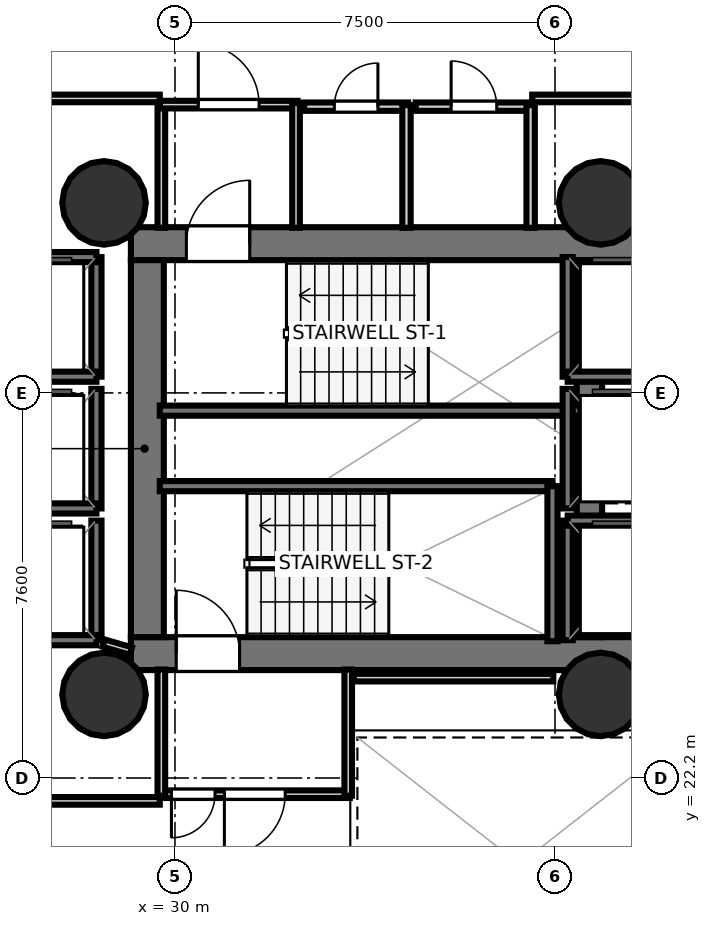
"""IFC4 building model, lengths in metres.
Left out: names, types, materials, properties, quantities, classifications, styles, units other than length and angle.
Written with IfcOpenShell. Run it as: python <this file> out.ifc"""

import sys

from ifc_helpers import new_model, si_unit, direction, frame, frame_2d, origin, origin_2d, place, context, subcontext, project, spatial, rectangle, hollow_circle, extrude, element, fill, save


model = new_model("IFC4")
c1 = context("Model", 3, precision=1e-05, world=origin(), true_north=direction((0.0, 1.0)))
c2 = subcontext(c1, "Body", "Model", "MODEL_VIEW")
j1 = project(units=[si_unit("LENGTHUNIT", "METRE"), si_unit("PLANEANGLEUNIT", "RADIAN")], contexts=[c1])
p1 = place(None, origin())
s1 = spatial("IfcSite", under=j1, at=p1, CompositionType="ELEMENT")
p2 = place(p1, origin())
s2 = spatial("IfcBuilding", under=s1, at=p2, CompositionType="ELEMENT")
p3 = place(p2, frame((0.0, 0.0, 56.2)))
s3 = spatial("IfcBuildingStorey", under=s2, at=p3, CompositionType="ELEMENT", Elevation=56.2)
p4 = place(p3, frame((29.13, 32.745, 0.0), z_axis=(0.0, 0.0, 1.0), x_axis=(1.0, 0.0, 0.0)))
e1 = element("IfcWall", 1, at=p4, inside=s3, PredefinedType="SHEAR", context=c2, shape_type="SweptSolid", body=[
    extrude(rectangle(XDim=10.72, YDim=0.65, at=frame_2d((5.36, 0.0))), origin(), (0.0, 0.0, 1.0), 3.52),
])
p5 = place(p4, frame((1.095, 0.0, 0.0)))
e2 = element("IfcOpeningElement", 2, at=p5, cuts=e1, PredefinedType="OPENING", context=c2, shape_type="SweptSolid", body=[
    extrude(rectangle(XDim=1.25, YDim=2.15, at=frame_2d((0.625, 1.075))), frame((0.0, 0.335, 0.0), z_axis=(0.0, -1.0, 0.0), x_axis=(1.0, 0.0, 0.0)), (0.0, 0.0, 1.0), 0.67),
])
p6 = place(p3, frame((29.13, 24.655, 0.0), z_axis=(0.0, 0.0, 1.0), x_axis=(1.0, 0.0, 0.0)))
e3 = element("IfcWall", 3, at=p6, inside=s3, PredefinedType="SHEAR", context=c2, shape_type="SweptSolid", body=[
    extrude(rectangle(XDim=10.72, YDim=0.65, at=frame_2d((5.36, 0.0))), origin(), (0.0, 0.0, 1.0), 3.52),
])
p7 = place(p6, frame((0.895, 0.0, 0.0)))
e4 = element("IfcOpeningElement", 4, at=p7, cuts=e3, PredefinedType="OPENING", context=c2, shape_type="SweptSolid", body=[
    extrude(rectangle(XDim=1.25, YDim=2.15, at=frame_2d((0.625, 1.075))), frame((0.0, 0.335, 0.0), z_axis=(0.0, -1.0, 0.0), x_axis=(1.0, 0.0, 0.0)), (0.0, 0.0, 1.0), 0.67),
])
p8 = place(p3, frame((29.455, 24.98, 0.0), z_axis=(0.0, 0.0, 1.0), x_axis=(0.0, 1.0, 0.0)))
e5 = element("IfcWall", 5, at=p8, inside=s3, PredefinedType="SHEAR", context=c2, shape_type="SweptSolid", body=[
    extrude(rectangle(XDim=7.44, YDim=0.65, at=frame_2d((3.72, 0.0))), origin(), (0.0, 0.0, 1.0), 3.52),
])
p9 = place(p3, frame((38.18, 24.98, 0.0), z_axis=(0.0, 0.0, 1.0), x_axis=(0.0, 1.0, 0.0)))
e6 = element("IfcWall", 6, at=p9, inside=s3, PredefinedType="SHEAR", context=c2, shape_type="SweptSolid", body=[
    extrude(rectangle(XDim=7.44, YDim=0.5, at=frame_2d((3.72, 0.0))), origin(), (0.0, 0.0, 1.0), 3.52),
])
for number, where, z_axis, x_axis in (
    (7, (28.6, 33.55, 0.0), (0.0, 0.0, 1.0), (1.0, 0.0, 0.0)),
    (8, (28.6, 23.85, 0.0), (0.0, 0.0, 1.0), (1.0, 0.0, 0.0)),
    (9, (38.4, 33.55, 0.0), (0.0, 0.0, 1.0), (1.0, 0.0, 0.0)),
    (10, (38.4, 23.85, 0.0), (0.0, 0.0, 1.0), (1.0, 0.0, 0.0)),
):
    element("IfcColumn", number, at=place(p3, frame(where, z_axis=z_axis, x_axis=x_axis)), inside=s3, PredefinedType="COLUMN", context=c2, shape_type="SweptSolid", body=[
        extrude(hollow_circle(Radius=0.825, WallThickness=0.04, at=origin_2d()), origin(), (0.0, 0.0, 1.0), 3.7),
    ])
p10 = place(p3, frame((29.7, 29.45, 0.0), z_axis=(0.0, 0.0, 1.0), x_axis=(1.0, 0.0, 0.0)))
e11 = element("IfcWall", 11, at=p10, inside=s3, PredefinedType="SOLIDWALL", context=c2, shape_type="SweptSolid", body=[
    extrude(rectangle(XDim=8.3, YDim=0.2, at=frame_2d((4.15, 0.0))), origin(), (0.0, 0.0, 1.0), 3.52),
])
p11 = place(p3, frame((29.7, 27.96, 0.0), z_axis=(0.0, 0.0, 1.0), x_axis=(1.0, 0.0, 0.0)))
e12 = element("IfcWall", 12, at=p11, inside=s3, PredefinedType="SOLIDWALL", context=c2, shape_type="SweptSolid", body=[
    extrude(rectangle(XDim=7.75, YDim=0.2, at=frame_2d((3.875, 0.0))), origin(), (0.0, 0.0, 1.0), 3.52),
])
p12 = place(p3, frame((37.45, 24.9, 0.0), z_axis=(0.0, 0.0, 1.0), x_axis=(0.0, 1.0, 0.0)))
e13 = element("IfcWall", 13, at=p12, inside=s3, PredefinedType="SOLIDWALL", context=c2, shape_type="SweptSolid", body=[
    extrude(rectangle(XDim=3.06, YDim=0.2, at=frame_2d((1.53, 0.0))), origin(), (0.0, 0.0, 1.0), 3.52),
])
p13 = place(p3, frame((37.75, 30.12, 0.0), z_axis=(0.0, 0.0, 1.0), x_axis=(0.0, 1.0, 0.0)))
e14 = element("IfcWall", 14, at=p13, inside=s3, PredefinedType="SOLIDWALL", context=c2, shape_type="SweptSolid", body=[
    extrude(rectangle(XDim=2.36, YDim=0.2, at=frame_2d((1.18, 0.0))), origin(), (0.0, 0.0, 1.0), 3.52),
])
p14 = place(p3, frame((37.75, 30.12, 0.0), z_axis=(0.0, 0.0, 1.0), x_axis=(1.0, 0.0, 0.0)))
e15 = element("IfcWall", 15, at=p14, inside=s3, PredefinedType="SOLIDWALL", context=c2, shape_type="SweptSolid", body=[
    extrude(rectangle(XDim=2.1, YDim=0.2, at=frame_2d((1.05, 0.0))), origin(), (0.0, 0.0, 1.0), 3.52),
])
p15 = place(p3, frame((37.75, 24.92, 0.0), z_axis=(0.0, 0.0, 1.0), x_axis=(0.0, 1.0, 0.0)))
e16 = element("IfcWall", 16, at=p15, inside=s3, PredefinedType="SOLIDWALL", context=c2, shape_type="SweptSolid", body=[
    extrude(rectangle(XDim=2.36, YDim=0.2, at=frame_2d((1.18, 0.0))), origin(), (0.0, 0.0, 1.0), 3.52),
])
p16 = place(p3, frame((37.75, 27.28, 0.0), z_axis=(0.0, 0.0, 1.0), x_axis=(1.0, 0.0, 0.0)))
e17 = element("IfcWall", 17, at=p16, inside=s3, PredefinedType="SOLIDWALL", context=c2, shape_type="SweptSolid", body=[
    extrude(rectangle(XDim=2.1, YDim=0.2, at=frame_2d((1.05, 0.0))), origin(), (0.0, 0.0, 1.0), 3.52),
])
p17 = place(p3, frame((28.45, 30.12, 0.0), z_axis=(0.0, 0.0, 1.0), x_axis=(0.0, 1.0, 0.0)))
e18 = element("IfcWall", 18, at=p17, inside=s3, PredefinedType="SOLIDWALL", context=c2, shape_type="SweptSolid", body=[
    extrude(rectangle(XDim=2.36, YDim=0.2, at=frame_2d((1.18, 0.0))), origin(), (0.0, 0.0, 1.0), 3.52),
])
for number, where, z_axis, x_axis in (
    (19, (26.35, 32.48, 0.0), (0.0, 0.0, 1.0), (1.0, 0.0, 0.0)),
    (20, (26.35, 30.12, 0.0), (0.0, 0.0, 1.0), (1.0, 0.0, 0.0)),
):
    element("IfcWall", number, at=place(p3, frame(where, z_axis=z_axis, x_axis=x_axis)), inside=s3, PredefinedType="SOLIDWALL", context=c2, shape_type="SweptSolid", body=[
        extrude(rectangle(XDim=2.1, YDim=0.2, at=frame_2d((1.05, 0.0))), origin(), (0.0, 0.0, 1.0), 3.52),
    ])
p18 = place(p3, frame((28.45, 27.52, 0.0), z_axis=(0.0, 0.0, 1.0), x_axis=(0.0, 1.0, 0.0)))
e21 = element("IfcWall", 21, at=p18, inside=s3, PredefinedType="SOLIDWALL", context=c2, shape_type="SweptSolid", body=[
    extrude(rectangle(XDim=2.36, YDim=0.2, at=frame_2d((1.18, 0.0))), origin(), (0.0, 0.0, 1.0), 3.52),
])
p19 = place(p3, frame((26.35, 27.52, 0.0), z_axis=(0.0, 0.0, 1.0), x_axis=(1.0, 0.0, 0.0)))
e22 = element("IfcWall", 22, at=p19, inside=s3, PredefinedType="SOLIDWALL", context=c2, shape_type="SweptSolid", body=[
    extrude(rectangle(XDim=2.1, YDim=0.2, at=frame_2d((1.05, 0.0))), origin(), (0.0, 0.0, 1.0), 3.52),
])
p20 = place(p3, frame((28.45, 24.92, 0.0), z_axis=(0.0, 0.0, 1.0), x_axis=(0.0, 1.0, 0.0)))
e23 = element("IfcWall", 23, at=p20, inside=s3, PredefinedType="SOLIDWALL", context=c2, shape_type="SweptSolid", body=[
    extrude(rectangle(XDim=2.36, YDim=0.2, at=frame_2d((1.18, 0.0))), origin(), (0.0, 0.0, 1.0), 3.52),
])
p21 = place(p3, frame((26.35, 24.92, 0.0), z_axis=(0.0, 0.0, 1.0), x_axis=(1.0, 0.0, 0.0)))
e24 = element("IfcWall", 24, at=p21, inside=s3, PredefinedType="SOLIDWALL", context=c2, shape_type="SweptSolid", body=[
    extrude(rectangle(XDim=2.1, YDim=0.2, at=frame_2d((1.05, 0.0))), origin(), (0.0, 0.0, 1.0), 3.52),
])
p22 = place(p3, frame((37.75, 27.52, 0.0), z_axis=(0.0, 0.0, 1.0), x_axis=(0.0, 1.0, 0.0)))
e25 = element("IfcWall", 25, at=p22, inside=s3, PredefinedType="SOLIDWALL", context=c2, shape_type="SweptSolid", body=[
    extrude(rectangle(XDim=2.36, YDim=0.2, at=frame_2d((1.18, 0.0))), origin(), (0.0, 0.0, 1.0), 3.52),
])
p23 = place(p3, frame((29.731, 33.058, 0.0), z_axis=(0.0, 0.0, 1.0), x_axis=(0.0, 1.0, 0.0)))
e26 = element("IfcWall", 26, at=p23, inside=s3, PredefinedType="PARTITIONING", context=c2, shape_type="SweptSolid", body=[
    extrude(rectangle(XDim=2.462, YDim=0.15, at=frame_2d((1.231, 0.0))), origin(), (0.0, 0.0, 1.0), 2.84),
])
p24 = place(p3, frame((29.7, 35.489, 0.0), z_axis=(0.0, 0.0, 1.0), x_axis=(1.0, 0.0, 0.0)))
e27 = element("IfcWall", 27, at=p24, inside=s3, PredefinedType="PARTITIONING", context=c2, shape_type="SweptSolid", body=[
    extrude(rectangle(XDim=2.72, YDim=0.15, at=frame_2d((1.36, 0.0))), origin(), (0.0, 0.0, 1.0), 2.84),
])
p25 = place(p24, frame((0.76, 0.0, 0.0)))
e28 = element("IfcOpeningElement", 28, at=p25, cuts=e27, PredefinedType="OPENING", context=c2, shape_type="SweptSolid", body=[
    extrude(rectangle(XDim=1.2, YDim=2.15, at=frame_2d((0.6, 1.075))), frame((0.0, 0.085, 0.0), z_axis=(0.0, -1.0, 0.0), x_axis=(1.0, 0.0, 0.0)), (0.0, 0.0, 1.0), 0.17),
])
p26 = place(p3, frame((32.389, 35.52, 0.0), z_axis=(0.0, 0.0, 1.0), x_axis=(0.0, -1.0, 0.0)))
e29 = element("IfcWall", 29, at=p26, inside=s3, PredefinedType="PARTITIONING", context=c2, shape_type="SweptSolid", body=[
    extrude(rectangle(XDim=2.462, YDim=0.15, at=frame_2d((1.231, 0.0))), origin(), (0.0, 0.0, 1.0), 2.84),
])
p27 = place(p3, frame((33.45, 21.881, 0.0), z_axis=(0.0, 0.0, 1.0), x_axis=(-1.0, 0.0, 0.0)))
e30 = element("IfcWall", 30, at=p27, inside=s3, PredefinedType="PARTITIONING", context=c2, shape_type="SweptSolid", body=[
    extrude(rectangle(XDim=3.75, YDim=0.15, at=frame_2d((1.875, 0.0))), origin(), (0.0, 0.0, 1.0), 2.84),
])
p28 = place(p27, frame((1.275, 0.0, 0.0)))
e31 = element("IfcOpeningElement", 31, at=p28, cuts=e30, PredefinedType="OPENING", context=c2, shape_type="SweptSolid", body=[
    extrude(rectangle(XDim=1.2, YDim=2.15, at=frame_2d((0.6, 1.075))), frame((0.0, 0.085, 0.0), z_axis=(0.0, -1.0, 0.0), x_axis=(1.0, 0.0, 0.0)), (0.0, 0.0, 1.0), 0.17),
])
p29 = place(p27, frame((2.66, 0.0, 0.0)))
e32 = element("IfcOpeningElement", 32, at=p29, cuts=e30, PredefinedType="OPENING", context=c2, shape_type="SweptSolid", body=[
    extrude(rectangle(XDim=0.86, YDim=2.05, at=frame_2d((0.43, 1.025))), frame((0.0, 0.085, 0.0), z_axis=(0.0, -1.0, 0.0), x_axis=(1.0, 0.0, 0.0)), (0.0, 0.0, 1.0), 0.17),
])
for number, where, z_axis, x_axis in (
    (33, (29.731, 21.85, 0.0), (0.0, 0.0, 1.0), (0.0, 1.0, 0.0)),
    (34, (33.419, 24.342, 0.0), (0.0, 0.0, 1.0), (0.0, -1.0, 0.0)),
):
    element("IfcWall", number, at=place(p3, frame(where, z_axis=z_axis, x_axis=x_axis)), inside=s3, PredefinedType="PARTITIONING", context=c2, shape_type="SweptSolid", body=[
        extrude(rectangle(XDim=2.492, YDim=0.15, at=frame_2d((1.246, 0.0))), origin(), (0.0, 0.0, 1.0), 2.84),
    ])
p30 = place(p3, frame((32.55, 35.449, 0.0), z_axis=(0.0, 0.0, 1.0), x_axis=(1.0, 0.0, 0.0)))
e35 = element("IfcWall", 35, at=p30, inside=s3, PredefinedType="PLUMBINGWALL", context=c2, shape_type="SweptSolid", body=[
    extrude(rectangle(XDim=2.05, YDim=0.165, at=frame_2d((1.025, 0.0))), origin(), (0.0, 0.0, 1.0), 2.84),
])
p31 = place(p30, frame((0.595, 0.0, 0.0)))
e36 = element("IfcOpeningElement", 36, at=p31, cuts=e35, PredefinedType="OPENING", context=c2, shape_type="SweptSolid", body=[
    extrude(rectangle(XDim=0.86, YDim=2.05, at=frame_2d((0.43, 1.025))), frame((0.0, 0.093, 0.0), z_axis=(0.0, -1.0, 0.0), x_axis=(1.0, 0.0, 0.0)), (0.0, 0.0, 1.0), 0.185),
])
p32 = place(p3, frame((34.569, 35.48, 0.0), z_axis=(0.0, 0.0, 1.0), x_axis=(0.0, -1.0, 0.0)))
e37 = element("IfcWall", 37, at=p32, inside=s3, PredefinedType="PLUMBINGWALL", context=c2, shape_type="SweptSolid", body=[
    extrude(rectangle(XDim=2.422, YDim=0.165, at=frame_2d((1.211, 0.0))), origin(), (0.0, 0.0, 1.0), 2.84),
])
p33 = place(p3, frame((34.75, 35.449, 0.0), z_axis=(0.0, 0.0, 1.0), x_axis=(1.0, 0.0, 0.0)))
e38 = element("IfcWall", 38, at=p33, inside=s3, PredefinedType="PLUMBINGWALL", context=c2, shape_type="SweptSolid", body=[
    extrude(rectangle(XDim=2.3, YDim=0.165, at=frame_2d((1.15, 0.0))), origin(), (0.0, 0.0, 1.0), 2.84),
])
p34 = place(p33, frame((0.7, 0.0, 0.0)))
e39 = element("IfcOpeningElement", 39, at=p34, cuts=e38, PredefinedType="OPENING", context=c2, shape_type="SweptSolid", body=[
    extrude(rectangle(XDim=0.9, YDim=2.1, at=frame_2d((0.45, 1.05))), frame((0.0, 0.093, 0.0), z_axis=(0.0, -1.0, 0.0), x_axis=(1.0, 0.0, 0.0)), (0.0, 0.0, 1.0), 0.185),
])
p35 = place(p3, frame((37.019, 35.48, 0.0), z_axis=(0.0, 0.0, 1.0), x_axis=(0.0, -1.0, 0.0)))
e40 = element("IfcWall", 40, at=p35, inside=s3, PredefinedType="PLUMBINGWALL", context=c2, shape_type="SweptSolid", body=[
    extrude(rectangle(XDim=2.422, YDim=0.165, at=frame_2d((1.211, 0.0))), origin(), (0.0, 0.0, 1.0), 2.84),
])
p36 = place(p3, frame((29.13, 24.706, 0.0), z_axis=(0.0, 0.0, 1.0), x_axis=(-0.960451214223, 0.278448316742, 0.0)))
e41 = element("IfcWall", 41, at=p36, inside=s3, PredefinedType="PARTITIONING", context=c2, shape_type="SweptSolid", body=[
    extrude(rectangle(XDim=0.562, YDim=0.15, at=frame_2d((0.281, 0.0))), origin(), (0.0, 0.0, 1.0), 2.84),
])
p37 = place(p3, frame((37.467, 24.181, 0.0), z_axis=(0.0, 0.0, 1.0), x_axis=(-1.0, 0.0, 0.0)))
e42 = element("IfcWall", 42, at=p37, inside=s3, PredefinedType="PARTITIONING", context=c2, shape_type="SweptSolid", body=[
    extrude(rectangle(XDim=3.937, YDim=0.15, at=frame_2d((1.968, 0.0))), origin(), (0.0, 0.0, 1.0), 2.84),
])
p38 = place(p3, frame((39.818, 35.611, 0.0), z_axis=(0.0, 0.0, 1.0), x_axis=(-1.0, 0.0, 0.0)))
e43 = element("IfcWall", 43, at=p38, inside=s3, PredefinedType="PARTITIONING", context=c2, shape_type="SweptSolid", body=[
    extrude(rectangle(XDim=2.768, YDim=0.15, at=frame_2d((1.384, 0.0))), origin(), (0.0, 0.0, 1.0), 2.84),
])
p39 = place(p3, frame((29.7, 35.611, 0.0), z_axis=(0.0, 0.0, 1.0), x_axis=(-1.0, 0.0, 0.0)))
e44 = element("IfcWall", 44, at=p39, inside=s3, PredefinedType="PARTITIONING", context=c2, shape_type="SweptSolid", body=[
    extrude(rectangle(XDim=3.28, YDim=0.15, at=frame_2d((1.64, 0.0))), origin(), (0.0, 0.0, 1.0), 2.798),
])
p40 = place(p3, frame((26.42, 21.749, 0.0), z_axis=(0.0, 0.0, 1.0), x_axis=(1.0, 0.0, 0.0)))
e45 = element("IfcWall", 45, at=p40, inside=s3, PredefinedType="PARTITIONING", context=c2, shape_type="SweptSolid", body=[
    extrude(rectangle(XDim=3.28, YDim=0.15, at=frame_2d((1.64, 0.0))), origin(), (0.0, 0.0, 1.0), 2.84),
])
p41 = place(p3, frame((51.319, 30.11, 0.0), z_axis=(0.0, 0.0, 1.0), x_axis=(-0.660511140623, -0.750816244572, 0.0)))
e46 = element("IfcWall", 46, at=p41, inside=s3, PredefinedType="PARTITIONING", context=c2, shape_type="SweptSolid", body=[
    extrude(rectangle(XDim=22.534, YDim=0.14, at=frame_2d((11.267, 0.0))), origin(), (0.0, 0.0, 1.0), 2.798),
])
p42 = place(p41, frame((11.342, 0.0, 0.0)))
e47 = element("IfcOpeningElement", 47, at=p42, cuts=e46, PredefinedType="OPENING", context=c2, shape_type="SweptSolid", body=[
    extrude(rectangle(XDim=1.25, YDim=2.2, at=frame_2d((0.625, 1.1))), frame((0.0, 0.08, 0.0), z_axis=(0.0, -1.0, 0.0), x_axis=(1.0, 0.0, 0.0)), (0.0, 0.0, 1.0), 0.16),
])
p43 = place(p5, origin())
e48 = element("IfcDoor", 48, at=p43, inside=s3, OperationType="SINGLE_SWING_RIGHT", PredefinedType="DOOR", context=c2, shape_type="SweptSolid", body=[
    extrude(rectangle(XDim=1.25, YDim=2.15, at=frame_2d((0.625, 1.075))), frame((0.0, 0.025, 0.0), z_axis=(0.0, -1.0, 0.0), x_axis=(1.0, 0.0, 0.0)), (0.0, 0.0, 1.0), 0.05),
])
fill(e2, e48)
p44 = place(p7, origin())
e49 = element("IfcDoor", 49, at=p44, inside=s3, OperationType="SINGLE_SWING_LEFT", PredefinedType="DOOR", context=c2, shape_type="SweptSolid", body=[
    extrude(rectangle(XDim=1.25, YDim=2.15, at=frame_2d((0.625, 1.075))), frame((0.0, 0.025, 0.0), z_axis=(0.0, -1.0, 0.0), x_axis=(1.0, 0.0, 0.0)), (0.0, 0.0, 1.0), 0.05),
])
fill(e4, e49)
p45 = place(p25, origin())
e50 = element("IfcDoor", 50, at=p45, inside=s3, OperationType="SINGLE_SWING_LEFT", PredefinedType="DOOR", context=c2, shape_type="SweptSolid", body=[
    extrude(rectangle(XDim=1.2, YDim=2.15, at=frame_2d((0.6, 1.075))), frame((0.0, 0.025, 0.0), z_axis=(0.0, -1.0, 0.0), x_axis=(1.0, 0.0, 0.0)), (0.0, 0.0, 1.0), 0.05),
])
fill(e28, e50)
p46 = place(p28, origin())
e51 = element("IfcDoor", 51, at=p46, inside=s3, OperationType="SINGLE_SWING_RIGHT", PredefinedType="DOOR", context=c2, shape_type="SweptSolid", body=[
    extrude(rectangle(XDim=1.2, YDim=2.15, at=frame_2d((0.6, 1.075))), frame((0.0, 0.025, 0.0), z_axis=(0.0, -1.0, 0.0), x_axis=(1.0, 0.0, 0.0)), (0.0, 0.0, 1.0), 0.05),
])
fill(e31, e51)
p47 = place(p31, origin())
e52 = element("IfcDoor", 52, at=p47, inside=s3, OperationType="SINGLE_SWING_RIGHT", PredefinedType="DOOR", context=c2, shape_type="SweptSolid", body=[
    extrude(rectangle(XDim=0.86, YDim=2.05, at=frame_2d((0.43, 1.025))), frame((0.0, 0.025, 0.0), z_axis=(0.0, -1.0, 0.0), x_axis=(1.0, 0.0, 0.0)), (0.0, 0.0, 1.0), 0.05),
])
fill(e36, e52)
p48 = place(p34, origin())
e53 = element("IfcDoor", 53, at=p48, inside=s3, OperationType="SINGLE_SWING_LEFT", PredefinedType="DOOR", context=c2, shape_type="SweptSolid", body=[
    extrude(rectangle(XDim=0.9, YDim=2.1, at=frame_2d((0.45, 1.05))), frame((0.0, 0.025, 0.0), z_axis=(0.0, -1.0, 0.0), x_axis=(1.0, 0.0, 0.0)), (0.0, 0.0, 1.0), 0.05),
])
fill(e39, e53)
p49 = place(p29, origin())
e54 = element("IfcDoor", 54, at=p49, inside=s3, OperationType="SINGLE_SWING_RIGHT", PredefinedType="DOOR", context=c2, shape_type="SweptSolid", body=[
    extrude(rectangle(XDim=0.86, YDim=2.05, at=frame_2d((0.43, 1.025))), frame((0.0, 0.025, 0.0), z_axis=(0.0, -1.0, 0.0), x_axis=(1.0, 0.0, 0.0)), (0.0, 0.0, 1.0), 0.05),
])
fill(e32, e54)
save(model, sys.argv[1])
